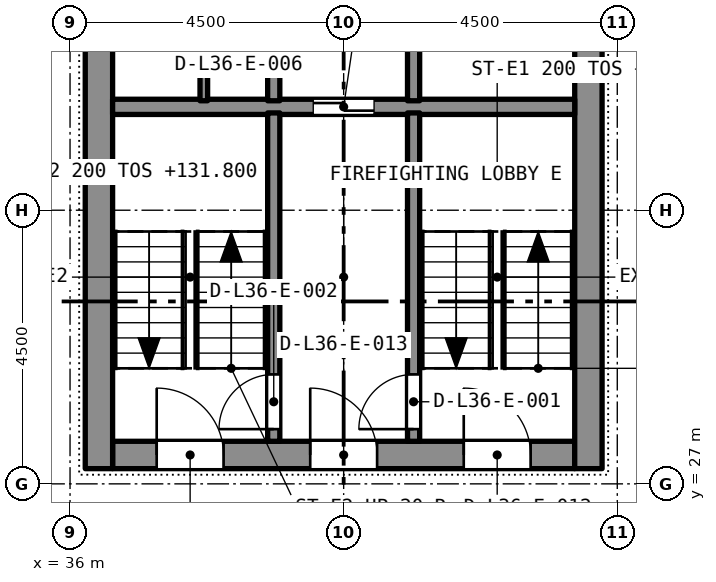
"""IFC4 building model, lengths in metres.
Left out: names, types, materials, properties, quantities, classifications, styles, units other than length and angle.
Written with IfcOpenShell. Run it as: python <this file> out.ifc"""

import sys

from ifc_helpers import new_model, si_unit, direction, frame, frame_2d, origin, place, context, subcontext, project, spatial, rectangle, extrude, element, fill, save


model = new_model("IFC4")
c1 = context("Model", 3, precision=1e-05, world=origin(), true_north=direction((0.0, 1.0)))
c2 = subcontext(c1, "Body", "Model", "MODEL_VIEW")
j1 = project(units=[si_unit("LENGTHUNIT", "METRE"), si_unit("PLANEANGLEUNIT", "RADIAN")], contexts=[c1])
p1 = place(None, origin())
s1 = spatial("IfcSite", under=j1, at=p1, CompositionType="ELEMENT")
p2 = place(p1, origin())
s2 = spatial("IfcBuilding", under=s1, at=p2, CompositionType="ELEMENT")
p3 = place(p2, frame((0.0, 0.0, 130.2)))
s3 = spatial("IfcBuildingStorey", under=s2, at=p3, CompositionType="ELEMENT", Elevation=130.2)
p4 = place(p3, frame((36.7, 27.475, 0.0), z_axis=(0.0, 0.0, 1.0), x_axis=(1.0, 0.0, 0.0)))
e1 = element("IfcWall", 1, at=p4, inside=s3, PredefinedType="SOLIDWALL", context=c2, shape_type="SweptSolid", body=[
    extrude(rectangle(XDim=7.6, YDim=0.45, at=frame_2d((3.8, 0.0))), origin(), (0.0, 0.0, 1.0), 3.2),
])
p5 = place(p4, frame((5.775, 0.0, 0.0)))
e2 = element("IfcOpeningElement", 2, at=p5, cuts=e1, PredefinedType="OPENING", context=c2, shape_type="SweptSolid", body=[
    extrude(rectangle(XDim=1.1, YDim=2.1, at=frame_2d((0.55, 1.05))), frame((0.0, 0.235, 0.0), z_axis=(0.0, -1.0, 0.0), x_axis=(1.0, 0.0, 0.0)), (0.0, 0.0, 1.0), 0.47),
])
p6 = place(p4, frame((3.25, 0.0, 0.0)))
e3 = element("IfcOpeningElement", 3, at=p6, cuts=e1, PredefinedType="OPENING", context=c2, shape_type="SweptSolid", body=[
    extrude(rectangle(XDim=1.1, YDim=2.1, at=frame_2d((0.55, 1.05))), frame((0.0, 0.235, 0.0), z_axis=(0.0, -1.0, 0.0), x_axis=(1.0, 0.0, 0.0)), (0.0, 0.0, 1.0), 0.47),
])
p7 = place(p4, frame((0.725, 0.0, 0.0)))
e4 = element("IfcOpeningElement", 4, at=p7, cuts=e1, PredefinedType="OPENING", context=c2, shape_type="SweptSolid", body=[
    extrude(rectangle(XDim=1.1, YDim=2.1, at=frame_2d((0.55, 1.05))), frame((0.0, 0.235, 0.0), z_axis=(0.0, -1.0, 0.0), x_axis=(1.0, 0.0, 0.0)), (0.0, 0.0, 1.0), 0.47),
])
p8 = place(p3, frame((36.475, 27.25, 0.0), z_axis=(0.0, 0.0, 1.0), x_axis=(0.0, 1.0, 0.0)))
e5 = element("IfcWall", 5, at=p8, inside=s3, PredefinedType="SOLIDWALL", context=c2, shape_type="SweptSolid", body=[
    extrude(rectangle(XDim=13.0, YDim=0.45, at=frame_2d((6.5, 0.0))), origin(), (0.0, 0.0, 1.0), 3.2),
])
p9 = place(p8, frame((8.7, 0.0, 0.0)))
e6 = element("IfcOpeningElement", 6, at=p9, cuts=e5, PredefinedType="OPENING", context=c2, shape_type="SweptSolid", body=[
    extrude(rectangle(XDim=1.2, YDim=2.1, at=frame_2d((0.6, 1.05))), frame((0.0, 0.235, 0.0), z_axis=(0.0, -1.0, 0.0), x_axis=(1.0, 0.0, 0.0)), (0.0, 0.0, 1.0), 0.47),
])
p10 = place(p3, frame((44.525, 27.25, 0.0), z_axis=(0.0, 0.0, 1.0), x_axis=(0.0, 1.0, 0.0)))
e7 = element("IfcWall", 7, at=p10, inside=s3, PredefinedType="SOLIDWALL", context=c2, shape_type="SweptSolid", body=[
    extrude(rectangle(XDim=13.0, YDim=0.45, at=frame_2d((6.5, 0.0))), origin(), (0.0, 0.0, 1.0), 3.2),
])
p11 = place(p10, frame((8.7, 0.0, 0.0)))
e8 = element("IfcOpeningElement", 8, at=p11, cuts=e7, PredefinedType="OPENING", context=c2, shape_type="SweptSolid", body=[
    extrude(rectangle(XDim=1.2, YDim=2.1, at=frame_2d((0.6, 1.05))), frame((0.0, 0.235, 0.0), z_axis=(0.0, -1.0, 0.0), x_axis=(1.0, 0.0, 0.0)), (0.0, 0.0, 1.0), 0.47),
])
p12 = place(p3, frame((36.7, 33.2, 0.0), z_axis=(0.0, 0.0, 1.0), x_axis=(1.0, 0.0, 0.0)))
e9 = element("IfcWall", 9, at=p12, inside=s3, PredefinedType="SOLIDWALL", context=c2, shape_type="SweptSolid", body=[
    extrude(rectangle(XDim=7.6, YDim=0.25, at=frame_2d((3.8, 0.0))), origin(), (0.0, 0.0, 1.0), 2.9),
])
p13 = place(p12, frame((3.3, 0.0, 0.0)))
e10 = element("IfcOpeningElement", 10, at=p13, cuts=e9, PredefinedType="OPENING", context=c2, shape_type="SweptSolid", body=[
    extrude(rectangle(XDim=1.0, YDim=2.1, at=frame_2d((0.5, 1.05))), frame((0.0, 0.135, 0.0), z_axis=(0.0, -1.0, 0.0), x_axis=(1.0, 0.0, 0.0)), (0.0, 0.0, 1.0), 0.27),
])
p14 = place(p3, frame((41.65, 27.7, 0.0), z_axis=(0.0, 0.0, 1.0), x_axis=(0.0, 1.0, 0.0)))
e11 = element("IfcWall", 11, at=p14, inside=s3, PredefinedType="SOLIDWALL", context=c2, shape_type="SweptSolid", body=[
    extrude(rectangle(XDim=5.4, YDim=0.2, at=frame_2d((2.7, 0.0))), origin(), (0.0, 0.0, 1.0), 2.9),
])
p15 = place(p14, frame((0.2, 0.0, 0.0)))
e12 = element("IfcOpeningElement", 12, at=p15, cuts=e11, PredefinedType="OPENING", context=c2, shape_type="SweptSolid", body=[
    extrude(rectangle(XDim=0.9, YDim=2.1, at=frame_2d((0.45, 1.05))), frame((0.0, 0.11, 0.0), z_axis=(0.0, -1.0, 0.0), x_axis=(1.0, 0.0, 0.0)), (0.0, 0.0, 1.0), 0.22),
])
p16 = place(p3, frame((39.35, 27.7, 0.0), z_axis=(0.0, 0.0, 1.0), x_axis=(0.0, 1.0, 0.0)))
e13 = element("IfcWall", 13, at=p16, inside=s3, PredefinedType="SOLIDWALL", context=c2, shape_type="SweptSolid", body=[
    extrude(rectangle(XDim=5.4, YDim=0.2, at=frame_2d((2.7, 0.0))), origin(), (0.0, 0.0, 1.0), 2.9),
])
p17 = place(p16, frame((0.2, 0.0, 0.0)))
e14 = element("IfcOpeningElement", 14, at=p17, cuts=e13, PredefinedType="OPENING", context=c2, shape_type="SweptSolid", body=[
    extrude(rectangle(XDim=0.9, YDim=2.1, at=frame_2d((0.45, 1.05))), frame((0.0, 0.11, 0.0), z_axis=(0.0, -1.0, 0.0), x_axis=(1.0, 0.0, 0.0)), (0.0, 0.0, 1.0), 0.22),
])
for number, where, z_axis, x_axis in (
    (15, (41.65, 33.3, 0.0), (0.0, 0.0, 1.0), (0.0, 1.0, 0.0)),
    (16, (39.35, 33.3, 0.0), (0.0, 0.0, 1.0), (0.0, 1.0, 0.0)),
):
    element("IfcWall", number, at=place(p3, frame(where, z_axis=z_axis, x_axis=x_axis)), inside=s3, PredefinedType="SOLIDWALL", context=c2, shape_type="SweptSolid", body=[
        extrude(rectangle(XDim=2.3, YDim=0.2, at=frame_2d((1.15, 0.0))), origin(), (0.0, 0.0, 1.0), 2.9),
    ])
p18 = place(p3, frame((38.2, 33.3, 0.0), z_axis=(0.0, 0.0, 1.0), x_axis=(0.0, 1.0, 0.0)))
e17 = element("IfcWall", 17, at=p18, inside=s3, PredefinedType="PARTITIONING", context=c2, shape_type="SweptSolid", body=[
    extrude(rectangle(XDim=2.3, YDim=0.125, at=frame_2d((1.15, 0.0))), origin(), (0.0, 0.0, 1.0), 2.9),
])
p19 = place(p15, origin())
e18 = element("IfcDoor", 18, at=p19, inside=s3, OperationType="SINGLE_SWING_LEFT", PredefinedType="DOOR", context=c2, shape_type="SweptSolid", body=[
    extrude(rectangle(XDim=0.9, YDim=2.1, at=frame_2d((0.45, 1.05))), frame((0.0, 0.025, 0.0), z_axis=(0.0, -1.0, 0.0), x_axis=(1.0, 0.0, 0.0)), (0.0, 0.0, 1.0), 0.05),
])
fill(e12, e18)
p20 = place(p17, origin())
e19 = element("IfcDoor", 19, at=p20, inside=s3, OperationType="SINGLE_SWING_LEFT", PredefinedType="DOOR", context=c2, shape_type="SweptSolid", body=[
    extrude(rectangle(XDim=0.9, YDim=2.1, at=frame_2d((0.45, 1.05))), frame((0.0, 0.025, 0.0), z_axis=(0.0, -1.0, 0.0), x_axis=(1.0, 0.0, 0.0)), (0.0, 0.0, 1.0), 0.05),
])
fill(e14, e19)
p21 = place(p13, origin())
e20 = element("IfcDoor", 20, at=p21, inside=s3, OperationType="SLIDING_TO_LEFT", PredefinedType="DOOR", context=c2, shape_type="SweptSolid", body=[
    extrude(rectangle(XDim=1.0, YDim=2.1, at=frame_2d((0.5, 1.05))), frame((0.0, 0.025, 0.0), z_axis=(0.0, -1.0, 0.0), x_axis=(1.0, 0.0, 0.0)), (0.0, 0.0, 1.0), 0.05),
])
fill(e10, e20)
p22 = place(p5, origin())
e21 = element("IfcDoor", 21, at=p22, inside=s3, OperationType="SINGLE_SWING_LEFT", PredefinedType="DOOR", context=c2, shape_type="SweptSolid", body=[
    extrude(rectangle(XDim=1.1, YDim=2.1, at=frame_2d((0.55, 1.05))), frame((0.0, 0.025, 0.0), z_axis=(0.0, -1.0, 0.0), x_axis=(1.0, 0.0, 0.0)), (0.0, 0.0, 1.0), 0.05),
])
fill(e2, e21)
p23 = place(p6, origin())
e22 = element("IfcDoor", 22, at=p23, inside=s3, OperationType="SINGLE_SWING_LEFT", PredefinedType="DOOR", context=c2, shape_type="SweptSolid", body=[
    extrude(rectangle(XDim=1.1, YDim=2.1, at=frame_2d((0.55, 1.05))), frame((0.0, 0.025, 0.0), z_axis=(0.0, -1.0, 0.0), x_axis=(1.0, 0.0, 0.0)), (0.0, 0.0, 1.0), 0.05),
])
fill(e3, e22)
p24 = place(p7, origin())
e23 = element("IfcDoor", 23, at=p24, inside=s3, OperationType="SINGLE_SWING_LEFT", PredefinedType="DOOR", context=c2, shape_type="SweptSolid", body=[
    extrude(rectangle(XDim=1.1, YDim=2.1, at=frame_2d((0.55, 1.05))), frame((0.0, 0.025, 0.0), z_axis=(0.0, -1.0, 0.0), x_axis=(1.0, 0.0, 0.0)), (0.0, 0.0, 1.0), 0.05),
])
fill(e4, e23)
save(model, sys.argv[1])
